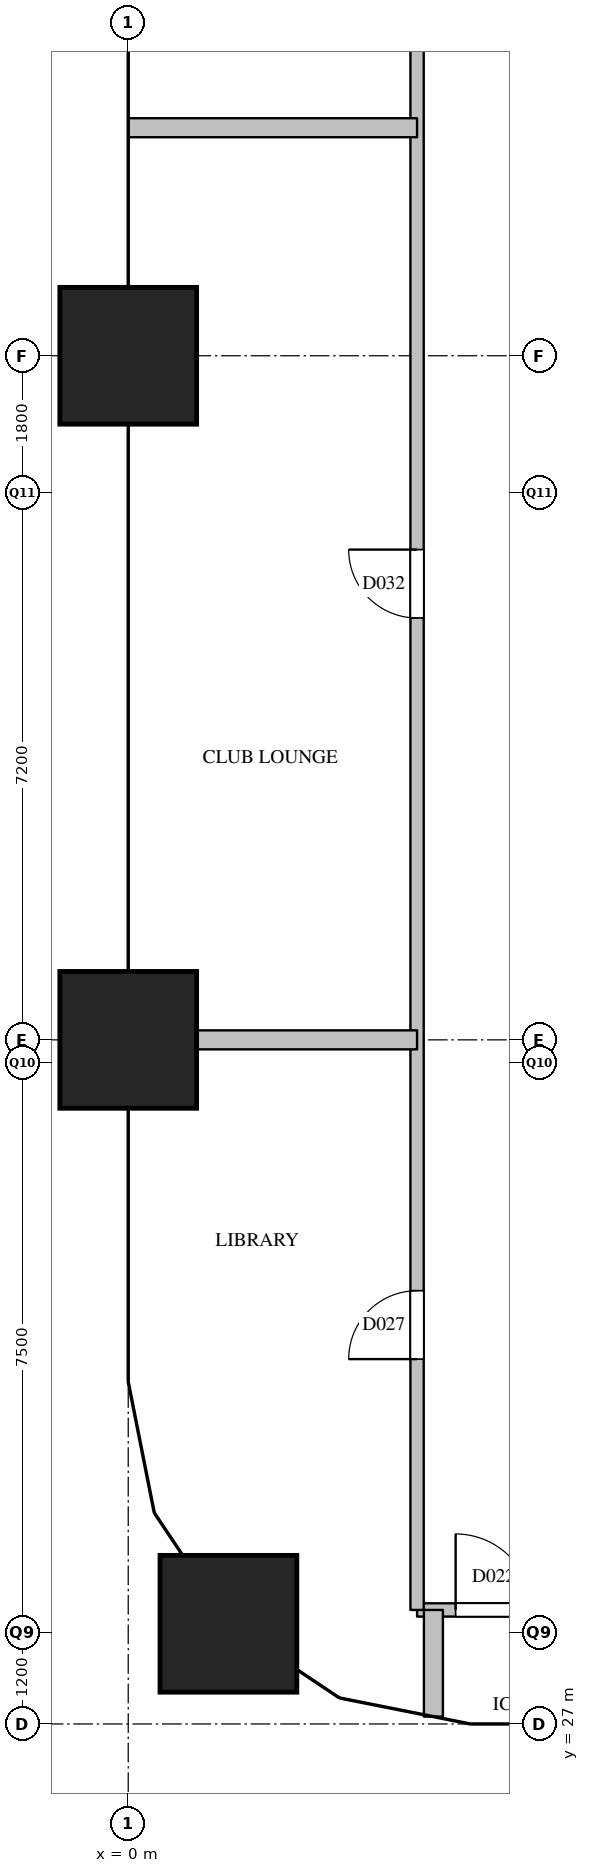
"""IFC4 building model, lengths in metres.
Left out: names, types, materials, properties, quantities, classifications, styles, units other than length and angle.
Written with IfcOpenShell. Run it as: python <this file> out.ifc"""

import sys

from ifc_helpers import new_model, si_unit, direction, frame, frame_2d, origin, origin_2d, place, context, subcontext, project, spatial, rectangle, extrude, element, fill, save


model = new_model("IFC4")
c1 = context("Model", 3, precision=1e-05, world=origin(), true_north=direction((0.0, 1.0)))
c2 = subcontext(c1, "Body", "Model", "MODEL_VIEW")
j1 = project(units=[si_unit("LENGTHUNIT", "METRE"), si_unit("PLANEANGLEUNIT", "RADIAN")], contexts=[c1])
p1 = place(None, origin())
s1 = spatial("IfcSite", under=j1, at=p1, CompositionType="ELEMENT")
p2 = place(p1, origin())
s2 = spatial("IfcBuilding", under=s1, at=p2, CompositionType="ELEMENT")
p3 = place(p2, frame((0.0, 0.0, 108.2)))
s3 = spatial("IfcBuildingStorey", under=s2, at=p3, CompositionType="ELEMENT", Elevation=108.2)
for number, where, z_axis, x_axis in (
    (1, (1.318, 28.318, 0.0), (0.0, 0.0, 1.0), (1.0, 0.0, 0.0)),
    (2, (0.0, 36.0, 0.0), (0.0, 0.0, 1.0), (1.0, 0.0, 0.0)),
    (3, (0.0, 45.0, 0.0), (0.0, 0.0, 1.0), (1.0, 0.0, 0.0)),
):
    element("IfcColumn", number, at=place(p3, frame(where, z_axis=z_axis, x_axis=x_axis)), inside=s3, PredefinedType="COLUMN", context=c2, shape_type="SweptSolid", body=[
        extrude(rectangle(XDim=1.8, YDim=1.8, at=origin_2d()), origin(), (0.0, 0.0, 1.0), 3.8),
    ])
p4 = place(p3, frame((3.8, 28.5, 0.0), z_axis=(0.0, 0.0, 1.0), x_axis=(1.0, 0.0, 0.0)))
e4 = element("IfcWall", 4, at=p4, inside=s3, PredefinedType="PARTITIONING", context=c2, shape_type="SweptSolid", body=[
    extrude(rectangle(XDim=1.8, YDim=0.175, at=frame_2d((0.9, 0.0))), origin(), (0.0, 0.0, 1.0), 3.5),
])
p5 = place(p4, frame((0.507, 0.0, 0.0)))
e5 = element("IfcOpeningElement", 5, at=p5, cuts=e4, PredefinedType="OPENING", context=c2, shape_type="SweptSolid", body=[
    extrude(rectangle(XDim=1.0, YDim=2.1, at=frame_2d((0.5, 1.05))), frame((0.0, 0.097, 0.0), z_axis=(0.0, -1.0, 0.0), x_axis=(1.0, 0.0, 0.0)), (0.0, 0.0, 1.0), 0.195),
])
p6 = place(p3, frame((3.8, 28.5, 0.0), z_axis=(0.0, 0.0, 1.0), x_axis=(0.0, 1.0, 0.0)))
e6 = element("IfcWall", 6, at=p6, inside=s3, PredefinedType="PARTITIONING", context=c2, shape_type="SweptSolid", body=[
    extrude(rectangle(XDim=23.3, YDim=0.175, at=frame_2d((11.65, 0.0))), origin(), (0.0, 0.0, 1.0), 3.5),
])
p7 = place(p6, frame((3.3, 0.0, 0.0)))
e7 = element("IfcOpeningElement", 7, at=p7, cuts=e6, PredefinedType="OPENING", context=c2, shape_type="SweptSolid", body=[
    extrude(rectangle(XDim=0.9, YDim=2.1, at=frame_2d((0.45, 1.05))), frame((0.0, 0.097, 0.0), z_axis=(0.0, -1.0, 0.0), x_axis=(1.0, 0.0, 0.0)), (0.0, 0.0, 1.0), 0.195),
])
p8 = place(p6, frame((13.05, 0.0, 0.0)))
e8 = element("IfcOpeningElement", 8, at=p8, cuts=e6, PredefinedType="OPENING", context=c2, shape_type="SweptSolid", body=[
    extrude(rectangle(XDim=0.9, YDim=2.1, at=frame_2d((0.45, 1.05))), frame((0.0, 0.097, 0.0), z_axis=(0.0, -1.0, 0.0), x_axis=(1.0, 0.0, 0.0)), (0.0, 0.0, 1.0), 0.195),
])
p9 = place(p6, frame((20.95, 0.0, 0.0)))
e9 = element("IfcOpeningElement", 9, at=p9, cuts=e6, PredefinedType="OPENING", context=c2, shape_type="SweptSolid", body=[
    extrude(rectangle(XDim=0.9, YDim=2.1, at=frame_2d((0.45, 1.05))), frame((0.0, 0.097, 0.0), z_axis=(0.0, -1.0, 0.0), x_axis=(1.0, 0.0, 0.0)), (0.0, 0.0, 1.0), 0.195),
])
p10 = place(p3, frame((0.0, 36.0, 0.0), z_axis=(0.0, 0.0, 1.0), x_axis=(1.0, 0.0, 0.0)))
e10 = element("IfcWall", 10, at=p10, inside=s3, PredefinedType="PARTITIONING", context=c2, shape_type="SweptSolid", body=[
    extrude(rectangle(XDim=3.8, YDim=0.25, at=frame_2d((1.9, 0.0))), origin(), (0.0, 0.0, 1.0), 3.5),
])
p11 = place(p3, frame((0.0, 48.0, 0.0), z_axis=(0.0, 0.0, 1.0), x_axis=(1.0, 0.0, 0.0)))
e11 = element("IfcWall", 11, at=p11, inside=s3, PredefinedType="PARTITIONING", context=c2, shape_type="SweptSolid", body=[
    extrude(rectangle(XDim=3.8, YDim=0.25, at=frame_2d((1.9, 0.0))), origin(), (0.0, 0.0, 1.0), 2.5),
])
p12 = place(p3, frame((4.015, 27.096, 0.0), z_axis=(0.0, 0.0, 1.0), x_axis=(0.0, 1.0, 0.0)))
e12 = element("IfcWall", 12, at=p12, inside=s3, PredefinedType="PARTITIONING", context=c2, shape_type="SweptSolid", body=[
    extrude(rectangle(XDim=1.404, YDim=0.25, at=frame_2d((0.702, 0.0))), origin(), (0.0, 0.0, 1.0), 2.5),
])
p13 = place(p5, origin())
e13 = element("IfcDoor", 13, at=p13, inside=s3, OperationType="SINGLE_SWING_LEFT", PredefinedType="DOOR", context=c2, shape_type="SweptSolid", body=[
    extrude(rectangle(XDim=1.0, YDim=2.1, at=frame_2d((0.5, 1.05))), frame((0.0, 0.025, 0.0), z_axis=(0.0, -1.0, 0.0), x_axis=(1.0, 0.0, 0.0)), (0.0, 0.0, 1.0), 0.05),
])
fill(e5, e13)
p14 = place(p7, origin())
e14 = element("IfcDoor", 14, at=p14, inside=s3, OperationType="SINGLE_SWING_LEFT", PredefinedType="DOOR", context=c2, shape_type="SweptSolid", body=[
    extrude(rectangle(XDim=0.9, YDim=2.1, at=frame_2d((0.45, 1.05))), frame((0.0, 0.025, 0.0), z_axis=(0.0, -1.0, 0.0), x_axis=(1.0, 0.0, 0.0)), (0.0, 0.0, 1.0), 0.05),
])
fill(e7, e14)
p15 = place(p8, origin())
e15 = element("IfcDoor", 15, at=p15, inside=s3, OperationType="SINGLE_SWING_RIGHT", PredefinedType="DOOR", context=c2, shape_type="SweptSolid", body=[
    extrude(rectangle(XDim=0.9, YDim=2.1, at=frame_2d((0.45, 1.05))), frame((0.0, 0.025, 0.0), z_axis=(0.0, -1.0, 0.0), x_axis=(1.0, 0.0, 0.0)), (0.0, 0.0, 1.0), 0.05),
])
fill(e8, e15)
save(model, sys.argv[1])
